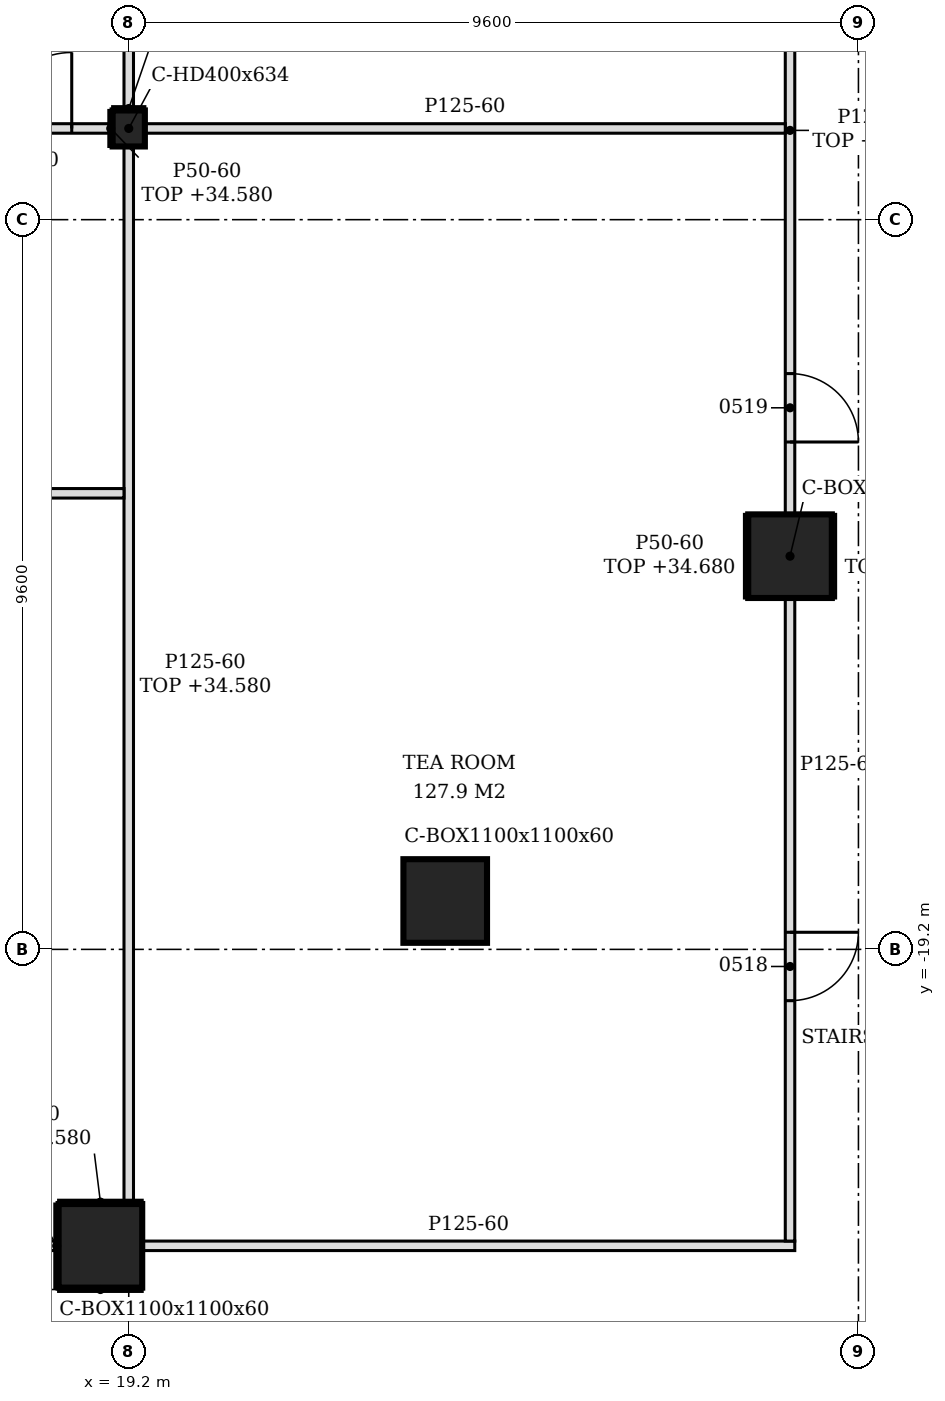
"""IFC4 building model, lengths in metres.
Left out: names, types, materials, properties, quantities, classifications, styles, units other than length and angle.
Written with IfcOpenShell. Run it as: python <this file> out.ifc"""

import sys

from ifc_helpers import new_model, si_unit, direction, frame, frame_2d, origin, origin_2d, place, context, subcontext, project, spatial, polyline, rectangle, hollow_rectangle, i_section, outline, extrude, element, fill, save


model = new_model("IFC4")
c1 = context("Model", 3, precision=1e-05, world=origin(), true_north=direction((0.0, 1.0)))
c2 = subcontext(c1, "Body", "Model", "MODEL_VIEW")
j1 = project(units=[si_unit("LENGTHUNIT", "METRE"), si_unit("PLANEANGLEUNIT", "RADIAN")], contexts=[c1])
p1 = place(None, origin())
s1 = spatial("IfcSite", under=j1, at=p1, CompositionType="ELEMENT")
p2 = place(p1, origin())
s2 = spatial("IfcBuilding", under=s1, at=p2, CompositionType="ELEMENT")
p3 = place(p2, frame((0.0, 0.0, 30.6)))
s3 = spatial("IfcBuildingStorey", under=s2, at=p3, CompositionType="ELEMENT", Elevation=30.6)
for number, where, z_axis, x_axis in (
    (1, (18.827, -23.1, -0.2), (0.0, 0.0, 1.0), (1.0, 0.0, 0.0)),
    (2, (23.364, -18.564, -0.2), (0.0, 0.0, 1.0), (1.0, 0.0, 0.0)),
    (3, (27.9, -14.027, -0.2), (0.0, 0.0, 1.0), (1.0, 0.0, 0.0)),
):
    element("IfcColumn", number, at=place(p3, frame(where, z_axis=z_axis, x_axis=x_axis)), inside=s3, PredefinedType="COLUMN", context=c2, shape_type="SweptSolid", body=[
        extrude(hollow_rectangle(XDim=1.1, YDim=1.1, WallThickness=0.06, at=origin_2d()), origin(), (0.0, 0.0, 1.0), 4.8),
    ])
p4 = place(p3, frame((19.2, -8.4, -0.2), z_axis=(0.0, 0.0, 1.0), x_axis=(1.0, 0.0, 0.0)))
e4 = element("IfcColumn", 4, at=p4, inside=s3, PredefinedType="COLUMN", context=c2, shape_type="SweptSolid", body=[
    extrude(i_section(OverallWidth=0.424, OverallDepth=0.474, WebThickness=0.048, FlangeThickness=0.077, FilletRadius=0.015, at=origin_2d()), origin(), (0.0, 0.0, 1.0), 4.8),
])
p5 = place(p3, frame((9.964, -23.1, 0.0), z_axis=(0.0, 0.0, 1.0), x_axis=(1.0, 0.0, 0.0)))
e5 = element("IfcWall", 5, at=p5, inside=s3, PredefinedType="PARTITIONING", context=c2, shape_type="SweptSolid", body=[
    extrude(rectangle(XDim=8.313, YDim=0.125, at=frame_2d((4.157, 0.0))), origin(), (0.0, 0.0, 1.0), 4.08),
])
p6 = place(p5, frame((3.986, 0.0, 0.0)))
e6 = element("IfcOpeningElement", 6, at=p6, cuts=e5, PredefinedType="OPENING", context=c2, shape_type="SweptSolid", body=[
    extrude(rectangle(XDim=0.9, YDim=2.1, at=frame_2d((0.45, 1.05))), frame((0.0, 0.073, 0.0), z_axis=(0.0, -1.0, 0.0), x_axis=(1.0, 0.0, 0.0)), (0.0, 0.0, 1.0), 0.145),
])
p7 = place(p3, frame((19.377, -23.1, 0.0), z_axis=(0.0, 0.0, 1.0), x_axis=(1.0, 0.0, 0.0)))
e7 = element("IfcWall", 7, at=p7, inside=s3, PredefinedType="PARTITIONING", context=c2, shape_type="SweptSolid", body=[
    extrude(rectangle(XDim=8.585, YDim=0.125, at=frame_2d((4.292, 0.0))), origin(), (0.0, 0.0, 1.0), 4.6),
])
p8 = place(p3, frame((27.9, -23.038, 0.0), z_axis=(0.0, 0.0, 1.0), x_axis=(0.0, 1.0, 0.0)))
e8 = element("IfcWall", 8, at=p8, inside=s3, PredefinedType="PARTITIONING", context=c2, shape_type="SweptSolid", body=[
    extrude(outline(polyline([(0.0, 0.0), (8.46, 0.0), (8.46, 4.6), (3.927, 4.6), (3.926, 4.18), (3.748, 4.18), (3.746, 4.6), (0.0, 4.6), (0.0, 0.0)])), frame((0.0, 0.062, 0.0), z_axis=(0.0, -1.0, 0.0), x_axis=(1.0, 0.0, 0.0)), (0.0, 0.0, 1.0), 0.125),
])
p9 = place(p8, frame((3.163, 0.0, 0.0)))
e9 = element("IfcOpeningElement", 9, at=p9, cuts=e8, PredefinedType="OPENING", context=c2, shape_type="SweptSolid", body=[
    extrude(rectangle(XDim=0.9, YDim=2.1, at=frame_2d((0.45, 1.05))), frame((0.0, 0.073, 0.0), z_axis=(0.0, -1.0, 0.0), x_axis=(1.0, 0.0, 0.0)), (0.0, 0.0, 1.0), 0.145),
])
p10 = place(p3, frame((19.2, -22.55, 0.0), z_axis=(0.0, 0.0, 1.0), x_axis=(0.0, 1.0, 0.0)))
e10 = element("IfcWall", 10, at=p10, inside=s3, PredefinedType="PARTITIONING", context=c2, shape_type="SweptSolid", body=[
    extrude(rectangle(XDim=13.913, YDim=0.125, at=frame_2d((6.957, 0.0))), origin(), (0.0, 0.0, 1.0), 3.98),
])
p11 = place(p3, frame((27.9, -13.477, 0.0), z_axis=(0.0, 0.0, 1.0), x_axis=(0.0, 1.0, 0.0)))
e11 = element("IfcWall", 11, at=p11, inside=s3, PredefinedType="PARTITIONING", context=c2, shape_type="SweptSolid", body=[
    extrude(rectangle(XDim=8.252, YDim=0.125, at=frame_2d((4.126, 0.0))), origin(), (0.0, 0.0, 1.0), 4.08),
])
p12 = place(p11, frame((0.952, 0.0, 0.0)))
e12 = element("IfcOpeningElement", 12, at=p12, cuts=e11, PredefinedType="OPENING", context=c2, shape_type="SweptSolid", body=[
    extrude(rectangle(XDim=0.9, YDim=2.1, at=frame_2d((0.45, 1.05))), frame((0.0, 0.073, 0.0), z_axis=(0.0, -1.0, 0.0), x_axis=(1.0, 0.0, 0.0)), (0.0, 0.0, 1.0), 0.145),
])
p13 = place(p3, frame((-4.738, -13.2, 0.0), z_axis=(0.0, 0.0, 1.0), x_axis=(1.0, 0.0, 0.0)))
e13 = element("IfcWall", 13, at=p13, inside=s3, PredefinedType="PARTITIONING", context=c2, shape_type="SweptSolid", body=[
    extrude(outline(polyline([(0.0, 0.0), (23.875, 0.0), (23.875, 3.98), (23.788, 3.98), (23.785, 4.6), (19.288, 4.6), (19.285, 3.98), (18.988, 3.98), (18.986, 4.6), (14.488, 4.6), (14.486, 3.98), (14.188, 3.98), (14.186, 4.6), (9.688, 4.6), (9.686, 3.98), (9.387, 3.98), (9.385, 4.6), (4.887, 4.6), (4.885, 3.98), (4.587, 3.98), (4.585, 4.6), (0.087, 4.6), (0.085, 3.98), (0.0, 3.98), (0.0, 0.0)])), frame((0.0, 0.062, 0.0), z_axis=(0.0, -1.0, 0.0), x_axis=(1.0, 0.0, 0.0)), (0.0, 0.0, 1.0), 0.125),
])
p14 = place(p3, frame((7.412, -8.4, 0.0), z_axis=(0.0, 0.0, 1.0), x_axis=(1.0, 0.0, 0.0)))
e14 = element("IfcWall", 14, at=p14, inside=s3, PredefinedType="PARTITIONING", context=c2, shape_type="SweptSolid", body=[
    extrude(rectangle(XDim=11.576, YDim=0.125, at=frame_2d((5.788, 0.0))), origin(), (0.0, 0.0, 1.0), 3.98),
])
p15 = place(p14, frame((4.138, 0.0, 0.0)))
e15 = element("IfcOpeningElement", 15, at=p15, cuts=e14, PredefinedType="OPENING", context=c2, shape_type="SweptSolid", body=[
    extrude(rectangle(XDim=0.8, YDim=2.1, at=frame_2d((0.4, 1.05))), frame((0.0, 0.073, 0.0), z_axis=(0.0, -1.0, 0.0), x_axis=(1.0, 0.0, 0.0)), (0.0, 0.0, 1.0), 0.145),
])
p16 = place(p14, frame((10.038, 0.0, 0.0)))
e16 = element("IfcOpeningElement", 16, at=p16, cuts=e14, PredefinedType="OPENING", context=c2, shape_type="SweptSolid", body=[
    extrude(rectangle(XDim=1.0, YDim=2.1, at=frame_2d((0.5, 1.05))), frame((0.0, 0.073, 0.0), z_axis=(0.0, -1.0, 0.0), x_axis=(1.0, 0.0, 0.0)), (0.0, 0.0, 1.0), 0.145),
])
p17 = place(p3, frame((19.412, -8.4, 0.0), z_axis=(0.0, 0.0, 1.0), x_axis=(1.0, 0.0, 0.0)))
e17 = element("IfcWall", 17, at=p17, inside=s3, PredefinedType="PARTITIONING", context=c2, shape_type="SweptSolid", body=[
    extrude(outline(polyline([(0.0, 0.0), (8.425, 0.0), (8.426, 4.08), (8.338, 4.08), (8.336, 4.6), (0.0, 4.6), (0.0, 0.0)])), frame((0.0, 0.062, 0.0), z_axis=(0.0, -1.0, 0.0), x_axis=(1.0, 0.0, 0.0)), (0.0, 0.0, 1.0), 0.125),
])
p18 = place(p3, frame((19.2, -8.163, 0.0), z_axis=(0.0, 0.0, 1.0), x_axis=(0.0, 1.0, 0.0)))
e18 = element("IfcWall", 18, at=p18, inside=s3, PredefinedType="PARTITIONING", context=c2, shape_type="SweptSolid", body=[
    extrude(rectangle(XDim=10.326, YDim=0.125, at=frame_2d((5.163, 0.0))), origin(), (0.0, 0.0, 1.0), 3.98),
])
p19 = place(p3, frame((18.277, -22.525, 0.0), z_axis=(0.0, 0.0, 1.0), x_axis=(1.0, 0.0, 0.0)))
e19 = element("IfcWall", 19, at=p19, inside=s3, PredefinedType="PARTITIONING", context=c2, shape_type="SweptSolid", body=[
    extrude(rectangle(XDim=1.1, YDim=0.05, at=frame_2d((0.55, 0.0))), origin(), (0.0, 0.0, 1.0), 3.98),
])
p20 = place(p3, frame((18.277, -23.675, 0.0), z_axis=(0.0, 0.0, 1.0), x_axis=(1.0, 0.0, 0.0)))
e20 = element("IfcWall", 20, at=p20, inside=s3, PredefinedType="PARTITIONING", context=c2, shape_type="SweptSolid", body=[
    extrude(rectangle(XDim=1.1, YDim=0.05, at=frame_2d((0.55, 0.0))), origin(), (0.0, 0.0, 1.0), 4.22),
])
p21 = place(p3, frame((18.252, -23.65, 0.0), z_axis=(0.0, 0.0, 1.0), x_axis=(0.0, 1.0, 0.0)))
e21 = element("IfcWall", 21, at=p21, inside=s3, PredefinedType="PARTITIONING", context=c2, shape_type="SweptSolid", body=[
    extrude(rectangle(XDim=1.1, YDim=0.05, at=frame_2d((0.55, 0.0))), origin(), (0.0, 0.0, 1.0), 4.08),
])
p22 = place(p3, frame((18.963, -8.637, 0.0), z_axis=(0.0, 0.0, 1.0), x_axis=(0.0, 1.0, 0.0)))
e22 = element("IfcWall", 22, at=p22, inside=s3, PredefinedType="PARTITIONING", context=c2, shape_type="SweptSolid", body=[
    extrude(rectangle(XDim=0.474, YDim=0.05, at=frame_2d((0.237, 0.0))), origin(), (0.0, 0.0, 1.0), 3.98),
])
for number, where, z_axis, x_axis in (
    (23, (27.325, -14.577, 0.0), (0.0, 0.0, 1.0), (0.0, 1.0, 0.0)),
    (24, (28.475, -14.577, 0.0), (0.0, 0.0, 1.0), (0.0, 1.0, 0.0)),
):
    element("IfcWall", number, at=place(p3, frame(where, z_axis=z_axis, x_axis=x_axis)), inside=s3, PredefinedType="PARTITIONING", context=c2, shape_type="SweptSolid", body=[
        extrude(rectangle(XDim=1.1, YDim=0.05, at=frame_2d((0.55, 0.0))), origin(), (0.0, 0.0, 1.0), 4.08),
    ])
p23 = place(p3, frame((18.988, -8.138, 0.0), z_axis=(0.0, 0.0, 1.0), x_axis=(1.0, 0.0, 0.0)))
e25 = element("IfcWall", 25, at=p23, inside=s3, PredefinedType="PARTITIONING", context=c2, shape_type="SweptSolid", body=[
    extrude(rectangle(XDim=0.424, YDim=0.05, at=frame_2d((0.212, 0.0))), origin(), (0.0, 0.0, 1.0), 3.98),
])
p24 = place(p16, origin())
e26 = element("IfcDoor", 26, at=p24, inside=s3, OperationType="SINGLE_SWING_RIGHT", PredefinedType="DOOR", context=c2, shape_type="SweptSolid", body=[
    extrude(rectangle(XDim=1.0, YDim=2.1, at=frame_2d((0.5, 1.05))), frame((0.0, 0.025, 0.0), z_axis=(0.0, -1.0, 0.0), x_axis=(1.0, 0.0, 0.0)), (0.0, 0.0, 1.0), 0.05),
])
fill(e16, e26)
p25 = place(p9, frame((0.9, 0.0, 0.0), z_axis=(0.0, 0.0, 1.0), x_axis=(-1.0, 0.0, 0.0)))
e27 = element("IfcDoor", 27, at=p25, inside=s3, OperationType="SINGLE_SWING_LEFT", PredefinedType="DOOR", context=c2, shape_type="SweptSolid", body=[
    extrude(rectangle(XDim=0.9, YDim=2.1, at=frame_2d((0.45, 1.05))), frame((0.0, 0.025, 0.0), z_axis=(0.0, -1.0, 0.0), x_axis=(1.0, 0.0, 0.0)), (0.0, 0.0, 1.0), 0.05),
])
fill(e9, e27)
p26 = place(p12, frame((0.9, 0.0, 0.0), z_axis=(0.0, 0.0, 1.0), x_axis=(-1.0, 0.0, 0.0)))
e28 = element("IfcDoor", 28, at=p26, inside=s3, OperationType="SINGLE_SWING_RIGHT", PredefinedType="DOOR", context=c2, shape_type="SweptSolid", body=[
    extrude(rectangle(XDim=0.9, YDim=2.1, at=frame_2d((0.45, 1.05))), frame((0.0, 0.025, 0.0), z_axis=(0.0, -1.0, 0.0), x_axis=(1.0, 0.0, 0.0)), (0.0, 0.0, 1.0), 0.05),
])
fill(e12, e28)
save(model, sys.argv[1])
